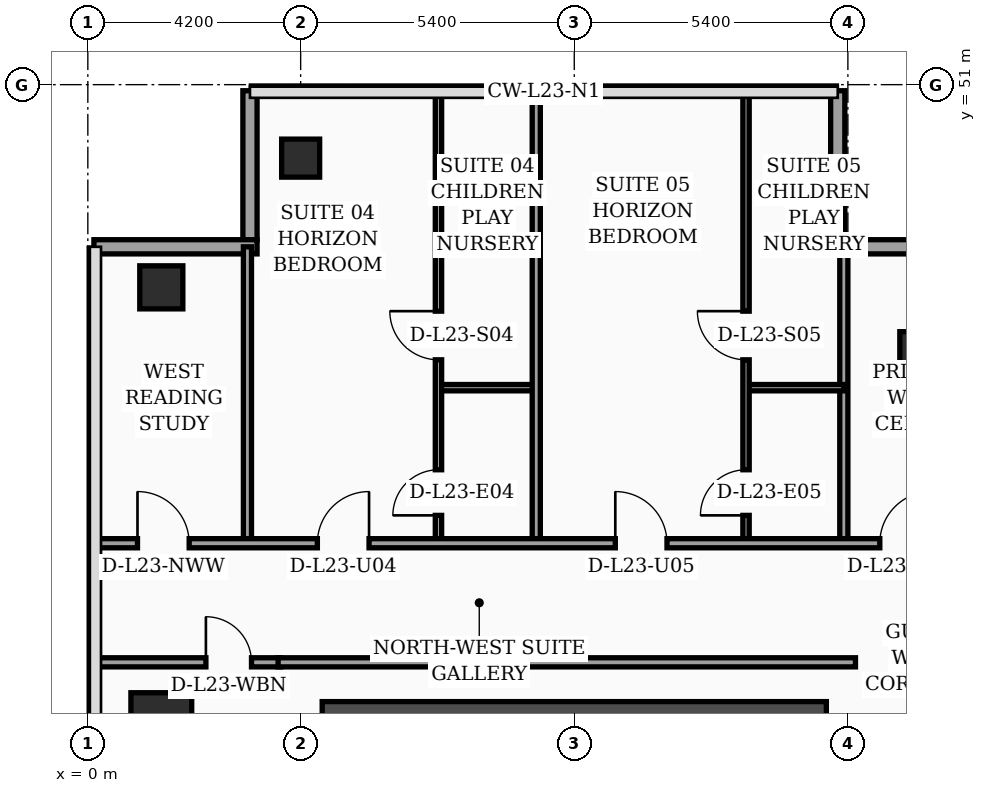
"""IFC4 building model, lengths in metres.
Left out: names, types, materials, properties, quantities, classifications, styles, units other than length and angle.
Written with IfcOpenShell. Run it as: python <this file> out.ifc"""

import sys

from ifc_helpers import new_model, si_unit, direction, frame, frame_2d, origin, origin_2d, place, context, subcontext, project, spatial, rectangle, hollow_rectangle, extrude, element, fill, save


model = new_model("IFC4")
c1 = context("Model", 3, precision=1e-05, world=origin(), true_north=direction((0.0, 1.0)))
c2 = subcontext(c1, "Body", "Model", "MODEL_VIEW")
j1 = project(units=[si_unit("LENGTHUNIT", "METRE"), si_unit("PLANEANGLEUNIT", "RADIAN")], contexts=[c1])
p1 = place(None, origin())
s1 = spatial("IfcSite", under=j1, at=p1, CompositionType="ELEMENT")
p2 = place(p1, origin())
s2 = spatial("IfcBuilding", under=s1, at=p2, CompositionType="ELEMENT")
p3 = place(p2, frame((0.0, 0.0, 97.4)))
s3 = spatial("IfcBuildingStorey", under=s2, at=p3, CompositionType="ELEMENT", Elevation=97.4)
p4 = place(p3, frame((4.625, 38.4, 0.0), z_axis=(0.0, 0.0, 1.0), x_axis=(1.0, 0.0, 0.0)))
e1 = element("IfcWall", 1, at=p4, inside=s3, PredefinedType="SHEAR", context=c2, shape_type="SweptSolid", body=[
    extrude(rectangle(XDim=9.95, YDim=0.85, at=frame_2d((4.975, 0.0))), origin(), (0.0, 0.0, 1.0), 3.56),
])
p5 = place(p3, frame((1.45, 38.4, 0.0), z_axis=(0.0, 0.0, 1.0), x_axis=(1.0, 0.0, 0.0)))
e2 = element("IfcColumn", 2, at=p5, inside=s3, PredefinedType="COLUMN", context=c2, shape_type="SweptSolid", body=[
    extrude(rectangle(XDim=1.2, YDim=1.2, at=origin_2d()), origin(), (0.0, 0.0, 1.0), 3.56),
])
p6 = place(p3, frame((1.45, 47.0, 0.0), z_axis=(0.0, 0.0, 1.0), x_axis=(1.0, 0.0, 0.0)))
e3 = element("IfcColumn", 3, at=p6, inside=s3, PredefinedType="COLUMN", context=c2, shape_type="SweptSolid", body=[
    extrude(hollow_rectangle(XDim=0.85, YDim=0.85, WallThickness=0.036, at=origin_2d()), origin(), (0.0, 0.0, 1.0), 3.56),
])
p7 = place(p3, frame((4.2, 49.55, 0.0), z_axis=(0.0, 0.0, 1.0), x_axis=(1.0, 0.0, 0.0)))
e4 = element("IfcColumn", 4, at=p7, inside=s3, PredefinedType="COLUMN", context=c2, shape_type="SweptSolid", body=[
    extrude(hollow_rectangle(XDim=0.75, YDim=0.75, WallThickness=0.032, at=origin_2d()), origin(), (0.0, 0.0, 1.0), 3.56),
])
p8 = place(p3, frame((16.55, 45.6, 0.0), z_axis=(0.0, 0.0, 1.0), x_axis=(1.0, 0.0, 0.0)))
e5 = element("IfcColumn", 5, at=p8, inside=s3, PredefinedType="COLUMN", context=c2, shape_type="SweptSolid", body=[
    extrude(rectangle(XDim=1.05, YDim=1.05, at=origin_2d()), origin(), (0.0, 0.0, 1.0), 3.56),
])
p9 = place(p3, frame((17.9, 47.8, 0.0), z_axis=(0.0, 0.0, 1.0), x_axis=(-1.0, 0.0, 0.0)))
e6 = element("IfcWall", 6, at=p9, inside=s3, PredefinedType="SOLIDWALL", context=c2, shape_type="SweptSolid", body=[
    extrude(rectangle(XDim=3.24, YDim=0.28, at=frame_2d((1.62, 0.0))), origin(), (0.0, 0.0, 1.0), 3.56),
])
p10 = place(p3, frame((14.8, 47.94, 0.0), z_axis=(0.0, 0.0, 1.0), x_axis=(0.0, 1.0, 0.0)))
e7 = element("IfcWall", 7, at=p10, inside=s3, PredefinedType="SOLIDWALL", context=c2, shape_type="SweptSolid", body=[
    extrude(rectangle(XDim=2.94, YDim=0.28, at=frame_2d((1.47, 0.0))), origin(), (0.0, 0.0, 1.0), 3.56),
])
p11 = place(p3, frame((3.2, 50.88, 0.0), z_axis=(0.0, 0.0, 1.0), x_axis=(0.0, -1.0, 0.0)))
e8 = element("IfcWall", 8, at=p11, inside=s3, PredefinedType="SOLIDWALL", context=c2, shape_type="SweptSolid", body=[
    extrude(rectangle(XDim=2.94, YDim=0.28, at=frame_2d((1.47, 0.0))), origin(), (0.0, 0.0, 1.0), 3.04),
])
p12 = place(p3, frame((3.34, 47.8, 0.0), z_axis=(0.0, 0.0, 1.0), x_axis=(-1.0, 0.0, 0.0)))
e9 = element("IfcWall", 9, at=p12, inside=s3, PredefinedType="SOLIDWALL", context=c2, shape_type="SweptSolid", body=[
    extrude(rectangle(XDim=3.22, YDim=0.28, at=frame_2d((1.61, 0.0))), origin(), (0.0, 0.0, 1.0), 3.04),
])
p13 = place(p3, frame((0.08, 39.6, 0.0), z_axis=(0.0, 0.0, 1.0), x_axis=(1.0, 0.0, 0.0)))
e10 = element("IfcWall", 10, at=p13, inside=s3, PredefinedType="PARTITIONING", context=c2, shape_type="SweptSolid", body=[
    extrude(rectangle(XDim=3.725, YDim=0.18, at=frame_2d((1.862, 0.0))), origin(), (0.0, 0.0, 1.0), 2.84),
])
p14 = place(p13, frame((2.25, 0.0, 0.0)))
e11 = element("IfcOpeningElement", 11, at=p14, cuts=e10, PredefinedType="OPENING", context=c2, shape_type="SweptSolid", body=[
    extrude(rectangle(XDim=0.9, YDim=2.15, at=frame_2d((0.45, 1.075))), frame((0.0, 0.1, 0.0), z_axis=(0.0, -1.0, 0.0), x_axis=(1.0, 0.0, 0.0)), (0.0, 0.0, 1.0), 0.2),
])
p15 = place(p3, frame((3.15, 41.95, 0.0), z_axis=(0.0, 0.0, 1.0), x_axis=(0.0, 1.0, 0.0)))
e12 = element("IfcWall", 12, at=p15, inside=s3, PredefinedType="PARTITIONING", context=c2, shape_type="SweptSolid", body=[
    extrude(rectangle(XDim=5.85, YDim=0.16, at=frame_2d((2.925, 0.0))), origin(), (0.0, 0.0, 1.0), 3.14),
])
p16 = place(p3, frame((14.92, 41.95, 0.0), z_axis=(0.0, 0.0, 1.0), x_axis=(0.0, 1.0, 0.0)))
e13 = element("IfcWall", 13, at=p16, inside=s3, PredefinedType="PARTITIONING", context=c2, shape_type="SweptSolid", body=[
    extrude(rectangle(XDim=5.85, YDim=0.16, at=frame_2d((2.925, 0.0))), origin(), (0.0, 0.0, 1.0), 3.04),
])
p17 = place(p3, frame((6.92, 45.02, 0.0), z_axis=(0.0, 0.0, 1.0), x_axis=(1.0, 0.0, 0.0)))
e14 = element("IfcWall", 14, at=p17, inside=s3, PredefinedType="PARTITIONING", context=c2, shape_type="SweptSolid", body=[
    extrude(rectangle(XDim=1.93, YDim=0.125, at=frame_2d((0.965, 0.0))), origin(), (0.0, 0.0, 1.0), 3.56),
])
p18 = place(p3, frame((6.92, 41.95, 0.0), z_axis=(0.0, 0.0, 1.0), x_axis=(0.0, 1.0, 0.0)))
e15 = element("IfcWall", 15, at=p18, inside=s3, PredefinedType="PARTITIONING", context=c2, shape_type="SweptSolid", body=[
    extrude(rectangle(XDim=8.99, YDim=0.125, at=frame_2d((4.495, 0.0))), origin(), (0.0, 0.0, 1.0), 3.04),
])
p19 = place(p18, frame((0.55, 0.0, 0.0)))
e16 = element("IfcOpeningElement", 16, at=p19, cuts=e15, PredefinedType="OPENING", context=c2, shape_type="SweptSolid", body=[
    extrude(rectangle(XDim=0.9, YDim=2.15, at=frame_2d((0.45, 1.075))), frame((0.0, 0.073, 0.0), z_axis=(0.0, -1.0, 0.0), x_axis=(1.0, 0.0, 0.0)), (0.0, 0.0, 1.0), 0.145),
])
p20 = place(p18, frame((3.62, 0.0, 0.0)))
e17 = element("IfcOpeningElement", 17, at=p20, cuts=e15, PredefinedType="OPENING", context=c2, shape_type="SweptSolid", body=[
    extrude(rectangle(XDim=0.96, YDim=2.2, at=frame_2d((0.48, 1.1))), frame((0.0, 0.073, 0.0), z_axis=(0.0, -1.0, 0.0), x_axis=(1.0, 0.0, 0.0)), (0.0, 0.0, 1.0), 0.145),
])
p21 = place(p3, frame((12.99, 45.02, 0.0), z_axis=(0.0, 0.0, 1.0), x_axis=(1.0, 0.0, 0.0)))
e18 = element("IfcWall", 18, at=p21, inside=s3, PredefinedType="PARTITIONING", context=c2, shape_type="SweptSolid", body=[
    extrude(rectangle(XDim=1.93, YDim=0.125, at=frame_2d((0.965, 0.0))), origin(), (0.0, 0.0, 1.0), 3.56),
])
p22 = place(p3, frame((12.99, 41.95, 0.0), z_axis=(0.0, 0.0, 1.0), x_axis=(0.0, 1.0, 0.0)))
e19 = element("IfcWall", 19, at=p22, inside=s3, PredefinedType="PARTITIONING", context=c2, shape_type="SweptSolid", body=[
    extrude(rectangle(XDim=8.99, YDim=0.125, at=frame_2d((4.495, 0.0))), origin(), (0.0, 0.0, 1.0), 3.04),
])
p23 = place(p22, frame((0.55, 0.0, 0.0)))
e20 = element("IfcOpeningElement", 20, at=p23, cuts=e19, PredefinedType="OPENING", context=c2, shape_type="SweptSolid", body=[
    extrude(rectangle(XDim=0.9, YDim=2.15, at=frame_2d((0.45, 1.075))), frame((0.0, 0.073, 0.0), z_axis=(0.0, -1.0, 0.0), x_axis=(1.0, 0.0, 0.0)), (0.0, 0.0, 1.0), 0.145),
])
p24 = place(p22, frame((3.62, 0.0, 0.0)))
e21 = element("IfcOpeningElement", 21, at=p24, cuts=e19, PredefinedType="OPENING", context=c2, shape_type="SweptSolid", body=[
    extrude(rectangle(XDim=0.96, YDim=2.2, at=frame_2d((0.48, 1.1))), frame((0.0, 0.073, 0.0), z_axis=(0.0, -1.0, 0.0), x_axis=(1.0, 0.0, 0.0)), (0.0, 0.0, 1.0), 0.145),
])
p25 = place(p3, frame((8.85, 41.95, 0.0), z_axis=(0.0, 0.0, 1.0), x_axis=(0.0, 1.0, 0.0)))
e22 = element("IfcWall", 22, at=p25, inside=s3, PredefinedType="PARTITIONING", context=c2, shape_type="SweptSolid", body=[
    extrude(rectangle(XDim=8.99, YDim=0.16, at=frame_2d((4.495, 0.0))), origin(), (0.0, 0.0, 1.0), 3.04),
])
p26 = place(p3, frame((0.08, 41.95, 0.0), z_axis=(0.0, 0.0, 1.0), x_axis=(1.0, 0.0, 0.0)))
e23 = element("IfcWall", 23, at=p26, inside=s3, PredefinedType="PARTITIONING", context=c2, shape_type="SweptSolid", body=[
    extrude(rectangle(XDim=17.77, YDim=0.18, at=frame_2d((8.885, 0.0))), origin(), (0.0, 0.0, 1.0), 2.84),
])
p27 = place(p26, frame((0.9, 0.0, 0.0)))
e24 = element("IfcOpeningElement", 24, at=p27, cuts=e23, PredefinedType="OPENING", context=c2, shape_type="SweptSolid", body=[
    extrude(rectangle(XDim=1.02, YDim=2.2, at=frame_2d((0.51, 1.1))), frame((0.0, 0.1, 0.0), z_axis=(0.0, -1.0, 0.0), x_axis=(1.0, 0.0, 0.0)), (0.0, 0.0, 1.0), 0.2),
])
p28 = place(p26, frame((4.45, 0.0, 0.0)))
e25 = element("IfcOpeningElement", 25, at=p28, cuts=e23, PredefinedType="OPENING", context=c2, shape_type="SweptSolid", body=[
    extrude(rectangle(XDim=1.02, YDim=2.2, at=frame_2d((0.51, 1.1))), frame((0.0, 0.1, 0.0), z_axis=(0.0, -1.0, 0.0), x_axis=(1.0, 0.0, 0.0)), (0.0, 0.0, 1.0), 0.2),
])
p29 = place(p26, frame((10.33, 0.0, 0.0)))
e26 = element("IfcOpeningElement", 26, at=p29, cuts=e23, PredefinedType="OPENING", context=c2, shape_type="SweptSolid", body=[
    extrude(rectangle(XDim=1.02, YDim=2.2, at=frame_2d((0.51, 1.1))), frame((0.0, 0.1, 0.0), z_axis=(0.0, -1.0, 0.0), x_axis=(1.0, 0.0, 0.0)), (0.0, 0.0, 1.0), 0.2),
])
p30 = place(p26, frame((15.55, 0.0, 0.0)))
e27 = element("IfcOpeningElement", 27, at=p30, cuts=e23, PredefinedType="OPENING", context=c2, shape_type="SweptSolid", body=[
    extrude(rectangle(XDim=1.02, YDim=2.2, at=frame_2d((0.51, 1.1))), frame((0.0, 0.1, 0.0), z_axis=(0.0, -1.0, 0.0), x_axis=(1.0, 0.0, 0.0)), (0.0, 0.0, 1.0), 0.2),
])
p31 = place(p3, frame((3.755, 39.6, 0.0), z_axis=(0.0, 0.0, 1.0), x_axis=(1.0, 0.0, 0.0)))
e28 = element("IfcWall", 28, at=p31, inside=s3, PredefinedType="PARTITIONING", context=c2, shape_type="SweptSolid", body=[
    extrude(rectangle(XDim=11.395, YDim=0.18, at=frame_2d((5.698, 0.0))), origin(), (0.0, 0.0, 1.0), 2.84),
])
p32 = place(p14, origin())
e29 = element("IfcDoor", 29, at=p32, inside=s3, OperationType="SINGLE_SWING_LEFT", PredefinedType="DOOR", context=c2, shape_type="SweptSolid", body=[
    extrude(rectangle(XDim=0.9, YDim=2.15, at=frame_2d((0.45, 1.075))), frame((0.0, 0.025, 0.0), z_axis=(0.0, -1.0, 0.0), x_axis=(1.0, 0.0, 0.0)), (0.0, 0.0, 1.0), 0.05),
])
fill(e11, e29)
p33 = place(p19, origin())
e30 = element("IfcDoor", 30, at=p33, inside=s3, OperationType="SINGLE_SWING_LEFT", PredefinedType="DOOR", context=c2, shape_type="SweptSolid", body=[
    extrude(rectangle(XDim=0.9, YDim=2.15, at=frame_2d((0.45, 1.075))), frame((0.0, 0.025, 0.0), z_axis=(0.0, -1.0, 0.0), x_axis=(1.0, 0.0, 0.0)), (0.0, 0.0, 1.0), 0.05),
])
fill(e16, e30)
p34 = place(p20, origin())
e31 = element("IfcDoor", 31, at=p34, inside=s3, OperationType="SINGLE_SWING_RIGHT", PredefinedType="DOOR", context=c2, shape_type="SweptSolid", body=[
    extrude(rectangle(XDim=0.96, YDim=2.2, at=frame_2d((0.48, 1.1))), frame((0.0, 0.025, 0.0), z_axis=(0.0, -1.0, 0.0), x_axis=(1.0, 0.0, 0.0)), (0.0, 0.0, 1.0), 0.05),
])
fill(e17, e31)
p35 = place(p23, origin())
e32 = element("IfcDoor", 32, at=p35, inside=s3, OperationType="SINGLE_SWING_LEFT", PredefinedType="DOOR", context=c2, shape_type="SweptSolid", body=[
    extrude(rectangle(XDim=0.9, YDim=2.15, at=frame_2d((0.45, 1.075))), frame((0.0, 0.025, 0.0), z_axis=(0.0, -1.0, 0.0), x_axis=(1.0, 0.0, 0.0)), (0.0, 0.0, 1.0), 0.05),
])
fill(e20, e32)
p36 = place(p24, origin())
e33 = element("IfcDoor", 33, at=p36, inside=s3, OperationType="SINGLE_SWING_RIGHT", PredefinedType="DOOR", context=c2, shape_type="SweptSolid", body=[
    extrude(rectangle(XDim=0.96, YDim=2.2, at=frame_2d((0.48, 1.1))), frame((0.0, 0.025, 0.0), z_axis=(0.0, -1.0, 0.0), x_axis=(1.0, 0.0, 0.0)), (0.0, 0.0, 1.0), 0.05),
])
fill(e21, e33)
p37 = place(p27, origin())
e34 = element("IfcDoor", 34, at=p37, inside=s3, OperationType="SINGLE_SWING_LEFT", PredefinedType="DOOR", context=c2, shape_type="SweptSolid", body=[
    extrude(rectangle(XDim=1.02, YDim=2.2, at=frame_2d((0.51, 1.1))), frame((0.0, 0.025, 0.0), z_axis=(0.0, -1.0, 0.0), x_axis=(1.0, 0.0, 0.0)), (0.0, 0.0, 1.0), 0.05),
])
fill(e24, e34)
p38 = place(p28, origin())
e35 = element("IfcDoor", 35, at=p38, inside=s3, OperationType="SINGLE_SWING_RIGHT", PredefinedType="DOOR", context=c2, shape_type="SweptSolid", body=[
    extrude(rectangle(XDim=1.02, YDim=2.2, at=frame_2d((0.51, 1.1))), frame((0.0, 0.025, 0.0), z_axis=(0.0, -1.0, 0.0), x_axis=(1.0, 0.0, 0.0)), (0.0, 0.0, 1.0), 0.05),
])
fill(e25, e35)
p39 = place(p29, origin())
e36 = element("IfcDoor", 36, at=p39, inside=s3, OperationType="SINGLE_SWING_LEFT", PredefinedType="DOOR", context=c2, shape_type="SweptSolid", body=[
    extrude(rectangle(XDim=1.02, YDim=2.2, at=frame_2d((0.51, 1.1))), frame((0.0, 0.025, 0.0), z_axis=(0.0, -1.0, 0.0), x_axis=(1.0, 0.0, 0.0)), (0.0, 0.0, 1.0), 0.05),
])
fill(e26, e36)
p40 = place(p30, origin())
e37 = element("IfcDoor", 37, at=p40, inside=s3, OperationType="SINGLE_SWING_RIGHT", PredefinedType="DOOR", context=c2, shape_type="SweptSolid", body=[
    extrude(rectangle(XDim=1.02, YDim=2.2, at=frame_2d((0.51, 1.1))), frame((0.0, 0.025, 0.0), z_axis=(0.0, -1.0, 0.0), x_axis=(1.0, 0.0, 0.0)), (0.0, 0.0, 1.0), 0.05),
])
fill(e27, e37)
save(model, sys.argv[1])
